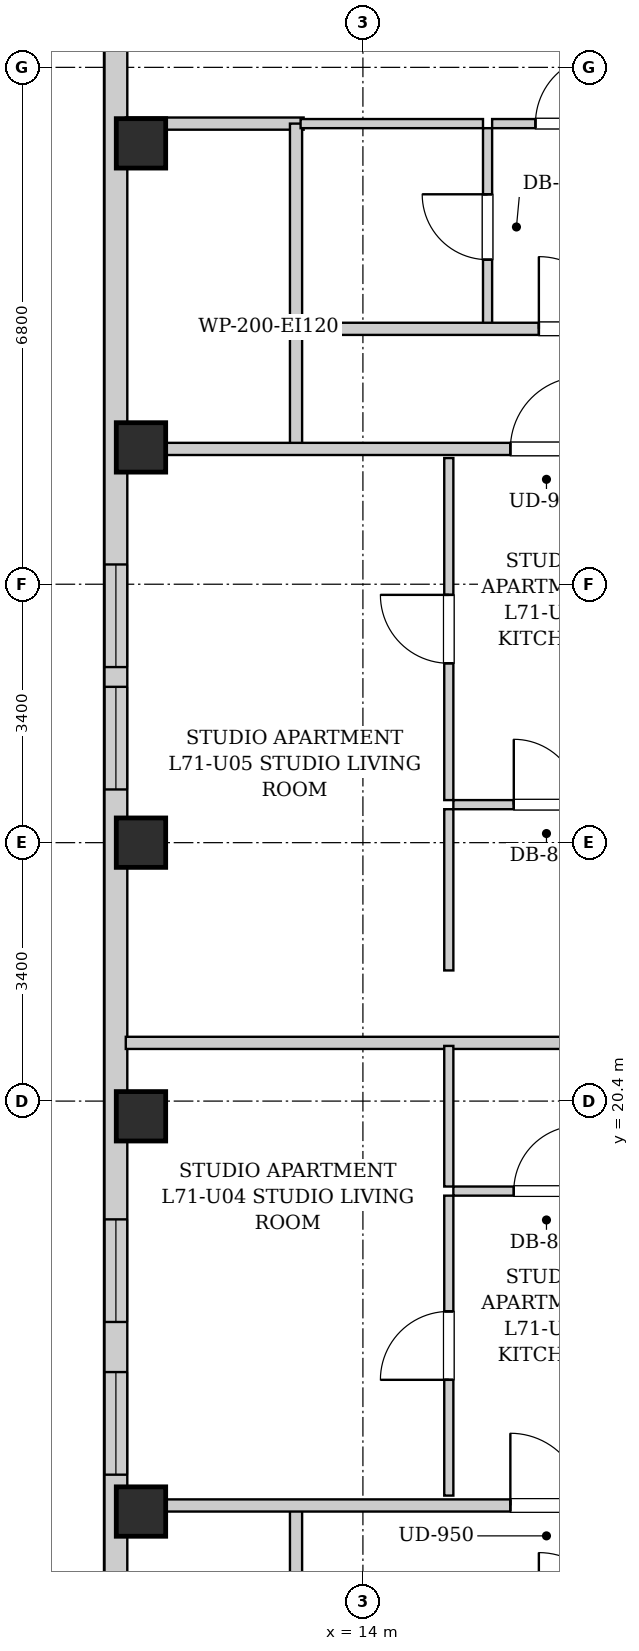
"""IFC4 building model, lengths in metres.
Left out: names, types, materials, properties, quantities, classifications, styles, units other than length and angle.
Written with IfcOpenShell. Run it as: python <this file> out.ifc"""

import sys

from ifc_helpers import new_model, si_unit, direction, frame, frame_2d, origin, origin_2d, place, context, subcontext, project, spatial, rectangle, extrude, element, fill, save


model = new_model("IFC4")
c1 = context("Model", 3, precision=1e-05, world=origin(), true_north=direction((0.0, 1.0)))
c2 = subcontext(c1, "Body", "Model", "MODEL_VIEW")
j1 = project(units=[si_unit("LENGTHUNIT", "METRE"), si_unit("PLANEANGLEUNIT", "RADIAN")], contexts=[c1])
p1 = place(None, origin())
s1 = spatial("IfcSite", under=j1, at=p1, CompositionType="ELEMENT")
p2 = place(p1, origin())
s2 = spatial("IfcBuilding", under=s1, at=p2, CompositionType="ELEMENT")
p3 = place(p2, frame((0.0, 0.0, 244.5)))
s3 = spatial("IfcBuildingStorey", under=s2, at=p3, CompositionType="ELEMENT", Elevation=244.5)
for number, where, z_axis, x_axis in (
    (1, (11.08, 15.0, 0.0), (0.0, 0.0, 1.0), (1.0, 0.0, 0.0)),
    (2, (11.08, 20.2, 0.0), (0.0, 0.0, 1.0), (1.0, 0.0, 0.0)),
    (3, (11.08, 23.8, 0.0), (0.0, 0.0, 1.0), (1.0, 0.0, 0.0)),
    (4, (11.08, 29.0, 0.0), (0.0, 0.0, 1.0), (1.0, 0.0, 0.0)),
    (5, (11.08, 33.0, 0.0), (0.0, 0.0, 1.0), (1.0, 0.0, 0.0)),
):
    element("IfcColumn", number, at=place(p3, frame(where, z_axis=z_axis, x_axis=x_axis)), inside=s3, PredefinedType="COLUMN", context=c2, shape_type="SweptSolid", body=[
        extrude(rectangle(XDim=0.65, YDim=0.65, at=origin_2d()), origin(), (0.0, 0.0, 1.0), 3.4),
    ])
p4 = place(p3, frame((10.75, 6.3, 0.0), z_axis=(0.0, 0.0, 1.0), x_axis=(0.0, 1.0, 0.0)))
e6 = element("IfcWall", 6, at=p4, inside=s3, PredefinedType="SOLIDWALL", context=c2, shape_type="SweptSolid", body=[
    extrude(rectangle(XDim=31.4, YDim=0.3, at=frame_2d((15.7, 0.0))), origin(), (0.0, 0.0, 1.0), 3.14),
])
p5 = place(p4, frame((1.653, 0.0, 0.55)))
e7 = element("IfcOpeningElement", 7, at=p5, cuts=e6, PredefinedType="OPENING", context=c2, shape_type="SweptSolid", body=[
    extrude(rectangle(XDim=1.35, YDim=1.2, at=frame_2d((0.675, 0.6))), frame((0.0, 0.16, 0.0), z_axis=(0.0, -1.0, 0.0), x_axis=(1.0, 0.0, 0.0)), (0.0, 0.0, 1.0), 0.32),
])
p6 = place(p4, frame((11.194, 0.0, 0.55)))
e8 = element("IfcOpeningElement", 8, at=p6, cuts=e6, PredefinedType="OPENING", context=c2, shape_type="SweptSolid", body=[
    extrude(rectangle(XDim=1.35, YDim=1.2, at=frame_2d((0.675, 0.6))), frame((0.0, 0.16, 0.0), z_axis=(0.0, -1.0, 0.0), x_axis=(1.0, 0.0, 0.0)), (0.0, 0.0, 1.0), 0.32),
])
p7 = place(p4, frame((9.185, 0.0, 0.55)))
e9 = element("IfcOpeningElement", 9, at=p7, cuts=e6, PredefinedType="OPENING", context=c2, shape_type="SweptSolid", body=[
    extrude(rectangle(XDim=1.35, YDim=1.2, at=frame_2d((0.675, 0.6))), frame((0.0, 0.16, 0.0), z_axis=(0.0, -1.0, 0.0), x_axis=(1.0, 0.0, 0.0)), (0.0, 0.0, 1.0), 0.32),
])
p8 = place(p4, frame((18.2, 0.0, 0.55)))
e10 = element("IfcOpeningElement", 10, at=p8, cuts=e6, PredefinedType="OPENING", context=c2, shape_type="SweptSolid", body=[
    extrude(rectangle(XDim=1.35, YDim=1.2, at=frame_2d((0.675, 0.6))), frame((0.0, 0.16, 0.0), z_axis=(0.0, -1.0, 0.0), x_axis=(1.0, 0.0, 0.0)), (0.0, 0.0, 1.0), 0.32),
])
p9 = place(p4, frame((19.81, 0.0, 0.55)))
e11 = element("IfcOpeningElement", 11, at=p9, cuts=e6, PredefinedType="OPENING", context=c2, shape_type="SweptSolid", body=[
    extrude(rectangle(XDim=1.35, YDim=1.2, at=frame_2d((0.675, 0.6))), frame((0.0, 0.16, 0.0), z_axis=(0.0, -1.0, 0.0), x_axis=(1.0, 0.0, 0.0)), (0.0, 0.0, 1.0), 0.32),
])
for number, where, z_axis, x_axis in (
    (12, (13.12, 13.51, 0.0), (0.0, 0.0, 1.0), (0.0, 1.0, 0.0)),
    (13, (13.12, 28.98, 0.0), (0.0, 0.0, 1.0), (0.0, 1.0, 0.0)),
):
    element("IfcWall", number, at=place(p3, frame(where, z_axis=z_axis, x_axis=x_axis)), inside=s3, PredefinedType="PARTITIONING", context=c2, shape_type="SweptSolid", body=[
        extrude(rectangle(XDim=1.58, YDim=0.16, at=frame_2d((0.79, 0.0))), origin(), (0.0, 0.0, 1.0), 3.14),
    ])
p10 = place(p3, frame((10.88, 33.26, 0.0), z_axis=(0.0, 0.0, 1.0), x_axis=(1.0, 0.0, 0.0)))
e14 = element("IfcWall", 14, at=p10, inside=s3, PredefinedType="PARTITIONING", context=c2, shape_type="SweptSolid", body=[
    extrude(rectangle(XDim=2.34, YDim=0.16, at=frame_2d((1.17, 0.0))), origin(), (0.0, 0.0, 1.0), 3.14),
])
p11 = place(p3, frame((13.12, 30.6, 0.0), z_axis=(0.0, 0.0, 1.0), x_axis=(0.0, 1.0, 0.0)))
e15 = element("IfcWall", 15, at=p11, inside=s3, PredefinedType="PARTITIONING", context=c2, shape_type="SweptSolid", body=[
    extrude(rectangle(XDim=2.66, YDim=0.16, at=frame_2d((1.33, 0.0))), origin(), (0.0, 0.0, 1.0), 3.14),
])
p12 = place(p3, frame((15.64, 30.6, 0.0), z_axis=(0.0, 0.0, 1.0), x_axis=(0.0, 1.0, 0.0)))
e16 = element("IfcWall", 16, at=p12, inside=s3, PredefinedType="PARTITIONING", context=c2, shape_type="SweptSolid", body=[
    extrude(rectangle(XDim=2.6, YDim=0.12, at=frame_2d((1.3, 0.0))), origin(), (0.0, 0.0, 1.0), 3.14),
])
p13 = place(p12, frame((0.87, 0.0, 0.0)))
e17 = element("IfcOpeningElement", 17, at=p13, cuts=e16, PredefinedType="OPENING", context=c2, shape_type="SweptSolid", body=[
    extrude(rectangle(XDim=0.86, YDim=2.05, at=frame_2d((0.43, 1.025))), frame((0.0, 0.07, 0.0), z_axis=(0.0, -1.0, 0.0), x_axis=(1.0, 0.0, 0.0)), (0.0, 0.0, 1.0), 0.14),
])
p14 = place(p3, frame((13.18, 33.26, 0.0), z_axis=(0.0, 0.0, 1.0), x_axis=(1.0, 0.0, 0.0)))
e18 = element("IfcWall", 18, at=p14, inside=s3, PredefinedType="PARTITIONING", context=c2, shape_type="SweptSolid", body=[
    extrude(rectangle(XDim=2.4, YDim=0.12, at=frame_2d((1.2, 0.0))), origin(), (0.0, 0.0, 1.0), 3.14),
])
p15 = place(p3, frame((15.7, 33.26, 0.0), z_axis=(0.0, 0.0, 1.0), x_axis=(1.0, 0.0, 0.0)))
e19 = element("IfcWall", 19, at=p15, inside=s3, PredefinedType="PARTITIONING", context=c2, shape_type="SweptSolid", body=[
    extrude(rectangle(XDim=2.04, YDim=0.12, at=frame_2d((1.02, 0.0))), origin(), (0.0, 0.0, 1.0), 3.14),
])
p16 = place(p15, frame((0.57, 0.0, 0.0)))
e20 = element("IfcOpeningElement", 20, at=p16, cuts=e19, PredefinedType="OPENING", context=c2, shape_type="SweptSolid", body=[
    extrude(rectangle(XDim=0.9, YDim=2.05, at=frame_2d((0.45, 1.025))), frame((0.0, 0.07, 0.0), z_axis=(0.0, -1.0, 0.0), x_axis=(1.0, 0.0, 0.0)), (0.0, 0.0, 1.0), 0.14),
])
p17 = place(p3, frame((10.88, 15.08, 0.0), z_axis=(0.0, 0.0, 1.0), x_axis=(1.0, 0.0, 0.0)))
e21 = element("IfcWall", 21, at=p17, inside=s3, PredefinedType="PARTITIONING", context=c2, shape_type="SweptSolid", body=[
    extrude(rectangle(XDim=6.88, YDim=0.16, at=frame_2d((3.44, 0.0))), origin(), (0.0, 0.0, 1.0), 2.668),
])
p18 = place(p17, frame((5.06, 0.0, 0.0)))
e22 = element("IfcOpeningElement", 22, at=p18, cuts=e21, PredefinedType="OPENING", context=c2, shape_type="SweptSolid", body=[
    extrude(rectangle(XDim=0.95, YDim=2.1, at=frame_2d((0.475, 1.05))), frame((0.0, 0.09, 0.0), z_axis=(0.0, -1.0, 0.0), x_axis=(1.0, 0.0, 0.0)), (0.0, 0.0, 1.0), 0.18),
])
p19 = place(p3, frame((10.88, 21.166, 0.0), z_axis=(0.0, 0.0, 1.0), x_axis=(1.0, 0.0, 0.0)))
e23 = element("IfcWall", 23, at=p19, inside=s3, PredefinedType="PARTITIONING", context=c2, shape_type="SweptSolid", body=[
    extrude(rectangle(XDim=6.76, YDim=0.16, at=frame_2d((3.38, 0.0))), origin(), (0.0, 0.0, 1.0), 3.14),
])
p20 = place(p3, frame((15.19, 19.216, 0.0), z_axis=(0.0, 0.0, 1.0), x_axis=(1.0, 0.0, 0.0)))
e24 = element("IfcWall", 24, at=p20, inside=s3, PredefinedType="PARTITIONING", context=c2, shape_type="SweptSolid", body=[
    extrude(rectangle(XDim=2.45, YDim=0.12, at=frame_2d((1.225, 0.0))), origin(), (0.0, 0.0, 1.0), 3.14),
])
p21 = place(p20, frame((0.795, 0.0, 0.0)))
e25 = element("IfcOpeningElement", 25, at=p21, cuts=e24, PredefinedType="OPENING", context=c2, shape_type="SweptSolid", body=[
    extrude(rectangle(XDim=0.86, YDim=2.05, at=frame_2d((0.43, 1.025))), frame((0.0, 0.07, 0.0), z_axis=(0.0, -1.0, 0.0), x_axis=(1.0, 0.0, 0.0)), (0.0, 0.0, 1.0), 0.14),
])
p22 = place(p3, frame((15.13, 19.276, 0.0), z_axis=(0.0, 0.0, 1.0), x_axis=(0.0, 1.0, 0.0)))
e26 = element("IfcWall", 26, at=p22, inside=s3, PredefinedType="PARTITIONING", context=c2, shape_type="SweptSolid", body=[
    extrude(rectangle(XDim=1.85, YDim=0.12, at=frame_2d((0.925, 0.0))), origin(), (0.0, 0.0, 1.0), 3.14),
])
p23 = place(p3, frame((15.13, 15.21, 0.0), z_axis=(0.0, 0.0, 1.0), x_axis=(0.0, 1.0, 0.0)))
e27 = element("IfcWall", 27, at=p23, inside=s3, PredefinedType="PARTITIONING", context=c2, shape_type="SweptSolid", body=[
    extrude(rectangle(XDim=3.946, YDim=0.12, at=frame_2d((1.973, 0.0))), origin(), (0.0, 0.0, 1.0), 3.14),
])
p24 = place(p23, frame((1.523, 0.0, 0.0)))
e28 = element("IfcOpeningElement", 28, at=p24, cuts=e27, PredefinedType="OPENING", context=c2, shape_type="SweptSolid", body=[
    extrude(rectangle(XDim=0.9, YDim=2.05, at=frame_2d((0.45, 1.025))), frame((0.0, 0.07, 0.0), z_axis=(0.0, -1.0, 0.0), x_axis=(1.0, 0.0, 0.0)), (0.0, 0.0, 1.0), 0.14),
])
p25 = place(p3, frame((10.88, 28.98, 0.0), z_axis=(0.0, 0.0, 1.0), x_axis=(1.0, 0.0, 0.0)))
e29 = element("IfcWall", 29, at=p25, inside=s3, PredefinedType="PARTITIONING", context=c2, shape_type="SweptSolid", body=[
    extrude(rectangle(XDim=6.88, YDim=0.16, at=frame_2d((3.44, 0.0))), origin(), (0.0, 0.0, 1.0), 2.668),
])
p26 = place(p25, frame((5.06, 0.0, 0.0)))
e30 = element("IfcOpeningElement", 30, at=p26, cuts=e29, PredefinedType="OPENING", context=c2, shape_type="SweptSolid", body=[
    extrude(rectangle(XDim=0.95, YDim=2.1, at=frame_2d((0.475, 1.05))), frame((0.0, 0.09, 0.0), z_axis=(0.0, -1.0, 0.0), x_axis=(1.0, 0.0, 0.0)), (0.0, 0.0, 1.0), 0.18),
])
p27 = place(p3, frame((15.19, 24.3, 0.0), z_axis=(0.0, 0.0, 1.0), x_axis=(1.0, 0.0, 0.0)))
e31 = element("IfcWall", 31, at=p27, inside=s3, PredefinedType="PARTITIONING", context=c2, shape_type="SweptSolid", body=[
    extrude(rectangle(XDim=2.45, YDim=0.12, at=frame_2d((1.225, 0.0))), origin(), (0.0, 0.0, 1.0), 3.14),
])
p28 = place(p27, frame((0.795, 0.0, 0.0)))
e32 = element("IfcOpeningElement", 32, at=p28, cuts=e31, PredefinedType="OPENING", context=c2, shape_type="SweptSolid", body=[
    extrude(rectangle(XDim=0.86, YDim=2.05, at=frame_2d((0.43, 1.025))), frame((0.0, 0.07, 0.0), z_axis=(0.0, -1.0, 0.0), x_axis=(1.0, 0.0, 0.0)), (0.0, 0.0, 1.0), 0.14),
])
p29 = place(p3, frame((15.13, 22.119, 0.0), z_axis=(0.0, 0.0, 1.0), x_axis=(0.0, 1.0, 0.0)))
e33 = element("IfcWall", 33, at=p29, inside=s3, PredefinedType="PARTITIONING", context=c2, shape_type="SweptSolid", body=[
    extrude(rectangle(XDim=2.121, YDim=0.12, at=frame_2d((1.061, 0.0))), origin(), (0.0, 0.0, 1.0), 3.14),
])
p30 = place(p3, frame((15.13, 24.36, 0.0), z_axis=(0.0, 0.0, 1.0), x_axis=(0.0, 1.0, 0.0)))
e34 = element("IfcWall", 34, at=p30, inside=s3, PredefinedType="PARTITIONING", context=c2, shape_type="SweptSolid", body=[
    extrude(rectangle(XDim=4.5, YDim=0.12, at=frame_2d((2.25, 0.0))), origin(), (0.0, 0.0, 1.0), 3.14),
])
p31 = place(p30, frame((1.8, 0.0, 0.0)))
e35 = element("IfcOpeningElement", 35, at=p31, cuts=e34, PredefinedType="OPENING", context=c2, shape_type="SweptSolid", body=[
    extrude(rectangle(XDim=0.9, YDim=2.05, at=frame_2d((0.45, 1.025))), frame((0.0, 0.07, 0.0), z_axis=(0.0, -1.0, 0.0), x_axis=(1.0, 0.0, 0.0)), (0.0, 0.0, 1.0), 0.14),
])
p32 = place(p3, frame((13.15, 30.56, 0.0), z_axis=(0.0, 0.0, 1.0), x_axis=(1.0, 0.0, 0.0)))
e36 = element("IfcWall", 36, at=p32, inside=s3, PredefinedType="PARTITIONING", context=c2, shape_type="SweptSolid", body=[
    extrude(rectangle(XDim=24.6, YDim=0.16, at=frame_2d((12.3, 0.0))), origin(), (0.0, 0.0, 1.0), 3.14),
])
p33 = place(p32, frame((3.165, 0.0, 0.0)))
e37 = element("IfcOpeningElement", 37, at=p33, cuts=e36, PredefinedType="OPENING", context=c2, shape_type="SweptSolid", body=[
    extrude(rectangle(XDim=0.95, YDim=2.1, at=frame_2d((0.475, 1.05))), frame((0.0, 0.09, 0.0), z_axis=(0.0, -1.0, 0.0), x_axis=(1.0, 0.0, 0.0)), (0.0, 0.0, 1.0), 0.18),
])
p34 = place(p13, origin())
e38 = element("IfcDoor", 38, at=p34, inside=s3, OperationType="SINGLE_SWING_RIGHT", PredefinedType="DOOR", context=c2, shape_type="SweptSolid", body=[
    extrude(rectangle(XDim=0.86, YDim=2.05, at=frame_2d((0.43, 1.025))), frame((0.0, 0.025, 0.0), z_axis=(0.0, -1.0, 0.0), x_axis=(1.0, 0.0, 0.0)), (0.0, 0.0, 1.0), 0.05),
])
fill(e17, e38)
p35 = place(p16, origin())
e39 = element("IfcDoor", 39, at=p35, inside=s3, OperationType="SINGLE_SWING_RIGHT", PredefinedType="DOOR", context=c2, shape_type="SweptSolid", body=[
    extrude(rectangle(XDim=0.9, YDim=2.05, at=frame_2d((0.45, 1.025))), frame((0.0, 0.025, 0.0), z_axis=(0.0, -1.0, 0.0), x_axis=(1.0, 0.0, 0.0)), (0.0, 0.0, 1.0), 0.05),
])
fill(e20, e39)
p36 = place(p18, origin())
e40 = element("IfcDoor", 40, at=p36, inside=s3, OperationType="SINGLE_SWING_LEFT", PredefinedType="DOOR", context=c2, shape_type="SweptSolid", body=[
    extrude(rectangle(XDim=0.95, YDim=2.1, at=frame_2d((0.475, 1.05))), frame((0.0, 0.025, 0.0), z_axis=(0.0, -1.0, 0.0), x_axis=(1.0, 0.0, 0.0)), (0.0, 0.0, 1.0), 0.05),
])
fill(e22, e40)
p37 = place(p21, origin())
e41 = element("IfcDoor", 41, at=p37, inside=s3, OperationType="SINGLE_SWING_RIGHT", PredefinedType="DOOR", context=c2, shape_type="SweptSolid", body=[
    extrude(rectangle(XDim=0.86, YDim=2.05, at=frame_2d((0.43, 1.025))), frame((0.0, 0.025, 0.0), z_axis=(0.0, -1.0, 0.0), x_axis=(1.0, 0.0, 0.0)), (0.0, 0.0, 1.0), 0.05),
])
fill(e25, e41)
p38 = place(p24, origin())
e42 = element("IfcDoor", 42, at=p38, inside=s3, OperationType="SINGLE_SWING_LEFT", PredefinedType="DOOR", context=c2, shape_type="SweptSolid", body=[
    extrude(rectangle(XDim=0.9, YDim=2.05, at=frame_2d((0.45, 1.025))), frame((0.0, 0.025, 0.0), z_axis=(0.0, -1.0, 0.0), x_axis=(1.0, 0.0, 0.0)), (0.0, 0.0, 1.0), 0.05),
])
fill(e28, e42)
p39 = place(p26, origin())
e43 = element("IfcDoor", 43, at=p39, inside=s3, OperationType="SINGLE_SWING_RIGHT", PredefinedType="DOOR", context=c2, shape_type="SweptSolid", body=[
    extrude(rectangle(XDim=0.95, YDim=2.1, at=frame_2d((0.475, 1.05))), frame((0.0, 0.025, 0.0), z_axis=(0.0, -1.0, 0.0), x_axis=(1.0, 0.0, 0.0)), (0.0, 0.0, 1.0), 0.05),
])
fill(e30, e43)
p40 = place(p28, origin())
e44 = element("IfcDoor", 44, at=p40, inside=s3, OperationType="SINGLE_SWING_LEFT", PredefinedType="DOOR", context=c2, shape_type="SweptSolid", body=[
    extrude(rectangle(XDim=0.86, YDim=2.05, at=frame_2d((0.43, 1.025))), frame((0.0, 0.025, 0.0), z_axis=(0.0, -1.0, 0.0), x_axis=(1.0, 0.0, 0.0)), (0.0, 0.0, 1.0), 0.05),
])
fill(e32, e44)
p41 = place(p31, origin())
e45 = element("IfcDoor", 45, at=p41, inside=s3, OperationType="SINGLE_SWING_RIGHT", PredefinedType="DOOR", context=c2, shape_type="SweptSolid", body=[
    extrude(rectangle(XDim=0.9, YDim=2.05, at=frame_2d((0.45, 1.025))), frame((0.0, 0.025, 0.0), z_axis=(0.0, -1.0, 0.0), x_axis=(1.0, 0.0, 0.0)), (0.0, 0.0, 1.0), 0.05),
])
fill(e35, e45)
p42 = place(p33, origin())
e46 = element("IfcDoor", 46, at=p42, inside=s3, OperationType="SINGLE_SWING_LEFT", PredefinedType="DOOR", context=c2, shape_type="SweptSolid", body=[
    extrude(rectangle(XDim=0.95, YDim=2.1, at=frame_2d((0.475, 1.05))), frame((0.0, 0.025, 0.0), z_axis=(0.0, -1.0, 0.0), x_axis=(1.0, 0.0, 0.0)), (0.0, 0.0, 1.0), 0.05),
])
fill(e37, e46)
p43 = place(p6, origin())
e47 = element("IfcWindow", 47, at=p43, inside=s3, PartitioningType="SINGLE_PANEL", PredefinedType="WINDOW", context=c2, shape_type="SweptSolid", body=[
    extrude(rectangle(XDim=1.35, YDim=1.2, at=frame_2d((0.675, 0.6))), frame((0.0, 0.03, 0.0), z_axis=(0.0, -1.0, 0.0), x_axis=(1.0, 0.0, 0.0)), (0.0, 0.0, 1.0), 0.06),
])
fill(e8, e47)
p44 = place(p7, origin())
e48 = element("IfcWindow", 48, at=p44, inside=s3, PartitioningType="SINGLE_PANEL", PredefinedType="WINDOW", context=c2, shape_type="SweptSolid", body=[
    extrude(rectangle(XDim=1.35, YDim=1.2, at=frame_2d((0.675, 0.6))), frame((0.0, 0.03, 0.0), z_axis=(0.0, -1.0, 0.0), x_axis=(1.0, 0.0, 0.0)), (0.0, 0.0, 1.0), 0.06),
])
fill(e9, e48)
p45 = place(p8, origin())
e49 = element("IfcWindow", 49, at=p45, inside=s3, PartitioningType="SINGLE_PANEL", PredefinedType="WINDOW", context=c2, shape_type="SweptSolid", body=[
    extrude(rectangle(XDim=1.35, YDim=1.2, at=frame_2d((0.675, 0.6))), frame((0.0, 0.03, 0.0), z_axis=(0.0, -1.0, 0.0), x_axis=(1.0, 0.0, 0.0)), (0.0, 0.0, 1.0), 0.06),
])
fill(e10, e49)
p46 = place(p9, origin())
e50 = element("IfcWindow", 50, at=p46, inside=s3, PartitioningType="SINGLE_PANEL", PredefinedType="WINDOW", context=c2, shape_type="SweptSolid", body=[
    extrude(rectangle(XDim=1.35, YDim=1.2, at=frame_2d((0.675, 0.6))), frame((0.0, 0.03, 0.0), z_axis=(0.0, -1.0, 0.0), x_axis=(1.0, 0.0, 0.0)), (0.0, 0.0, 1.0), 0.06),
])
fill(e11, e50)
save(model, sys.argv[1])
